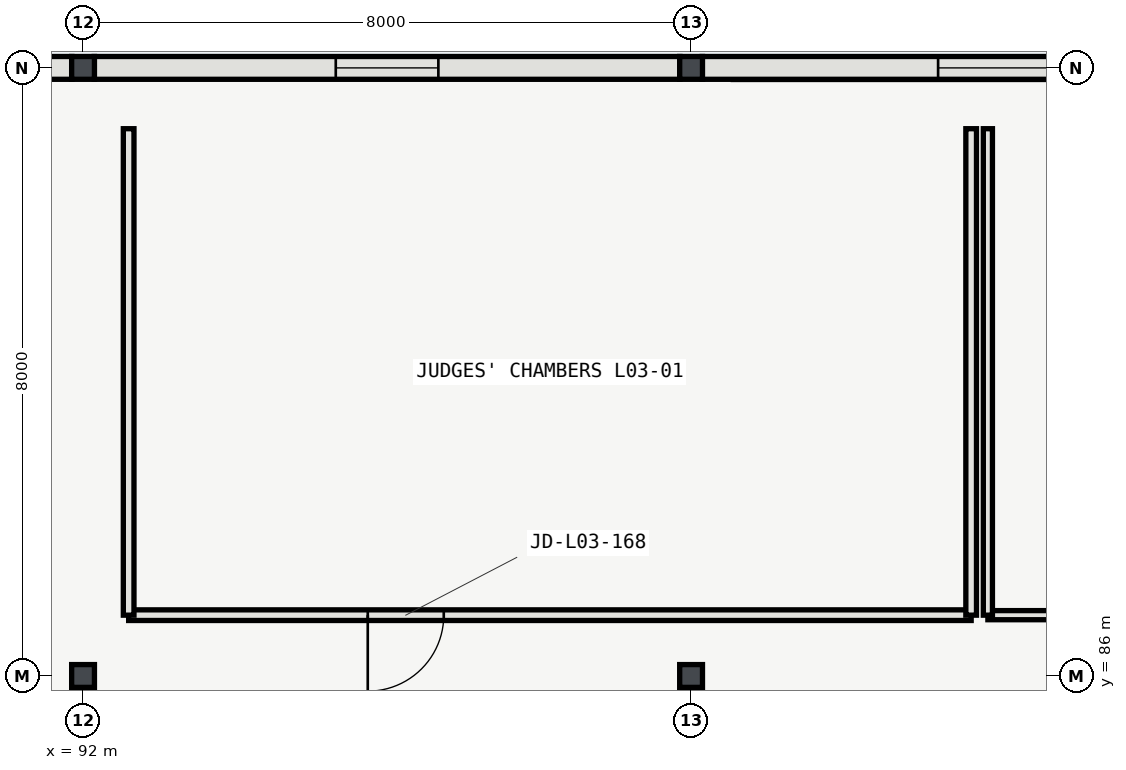
"""IFC4 building model, lengths in metres.
Left out: names, types, materials, properties, quantities, classifications, styles, units other than length and angle.
Written with IfcOpenShell. Run it as: python <this file> out.ifc"""

import sys

from ifc_helpers import new_model, si_unit, direction, frame, frame_2d, origin, origin_2d, place, context, subcontext, project, spatial, rectangle, i_section, extrude, element, fill, save


model = new_model("IFC4")
c1 = context("Model", 3, precision=1e-05, world=origin(), true_north=direction((0.0, 1.0)))
c2 = subcontext(c1, "Body", "Model", "MODEL_VIEW")
j1 = project(units=[si_unit("LENGTHUNIT", "METRE"), si_unit("PLANEANGLEUNIT", "RADIAN")], contexts=[c1])
p1 = place(None, origin())
s1 = spatial("IfcSite", under=j1, at=p1, CompositionType="ELEMENT")
p2 = place(p1, origin())
s2 = spatial("IfcBuilding", under=s1, at=p2, CompositionType="ELEMENT")
p3 = place(p2, frame((0.0, 0.0, 16.2)))
s3 = spatial("IfcBuildingStorey", under=s2, at=p3, CompositionType="ELEMENT", Elevation=16.2)
for number, where, z_axis, x_axis in (
    (1, (92.0, 86.0, 0.0), (0.0, 0.0, 1.0), (1.0, 0.0, 0.0)),
    (2, (92.0, 94.0, 0.0), (0.0, 0.0, 1.0), (1.0, 0.0, 0.0)),
    (3, (100.0, 86.0, 0.0), (0.0, 0.0, 1.0), (1.0, 0.0, 0.0)),
    (4, (100.0, 94.0, 0.0), (0.0, 0.0, 1.0), (1.0, 0.0, 0.0)),
):
    element("IfcColumn", number, at=place(p3, frame(where, z_axis=z_axis, x_axis=x_axis)), inside=s3, PredefinedType="COLUMN", context=c2, shape_type="SweptSolid", body=[
        extrude(i_section(OverallWidth=0.3, OverallDepth=0.3, WebThickness=0.01, FlangeThickness=0.015, FilletRadius=0.018, at=origin_2d()), origin(), (0.0, 0.0, 1.0), 4.2),
    ])
p4 = place(p3, frame((91.854, 94.0, 0.0), z_axis=(0.0, 0.0, 1.0), x_axis=(-1.0, 0.0, 0.0)))
e5 = element("IfcWall", 5, at=p4, inside=s3, PredefinedType="SOLIDWALL", context=c2, shape_type="SweptSolid", body=[
    extrude(rectangle(XDim=7.558, YDim=0.3, at=frame_2d((3.779, 0.0))), origin(), (0.0, 0.0, 1.0), 3.423),
])
p5 = place(p4, frame((3.254, 0.0, 0.95)))
e6 = element("IfcOpeningElement", 6, at=p5, cuts=e5, PredefinedType="OPENING", context=c2, shape_type="SweptSolid", body=[
    extrude(rectangle(XDim=1.2, YDim=1.8, at=frame_2d((0.6, 0.9))), frame((0.0, 0.16, 0.0), z_axis=(0.0, -1.0, 0.0), x_axis=(1.0, 0.0, 0.0)), (0.0, 0.0, 1.0), 0.32),
])
p6 = place(p3, frame((99.854, 94.0, 0.0), z_axis=(0.0, 0.0, 1.0), x_axis=(-1.0, 0.0, 0.0)))
e7 = element("IfcWall", 7, at=p6, inside=s3, PredefinedType="SOLIDWALL", context=c2, shape_type="SweptSolid", body=[
    extrude(rectangle(XDim=7.708, YDim=0.3, at=frame_2d((3.854, 0.0))), origin(), (0.0, 0.0, 1.0), 3.423),
])
p7 = place(p6, frame((3.179, 0.0, 0.95)))
e8 = element("IfcOpeningElement", 8, at=p7, cuts=e7, PredefinedType="OPENING", context=c2, shape_type="SweptSolid", body=[
    extrude(rectangle(XDim=1.35, YDim=1.8, at=frame_2d((0.675, 0.9))), frame((0.0, 0.16, 0.0), z_axis=(0.0, -1.0, 0.0), x_axis=(1.0, 0.0, 0.0)), (0.0, 0.0, 1.0), 0.32),
])
p8 = place(p3, frame((107.854, 94.0, 0.0), z_axis=(0.0, 0.0, 1.0), x_axis=(-1.0, 0.0, 0.0)))
e9 = element("IfcWall", 9, at=p8, inside=s3, PredefinedType="SOLIDWALL", context=c2, shape_type="SweptSolid", body=[
    extrude(rectangle(XDim=7.708, YDim=0.3, at=frame_2d((3.854, 0.0))), origin(), (0.0, 0.0, 1.0), 3.423),
])
p9 = place(p8, frame((3.104, 0.0, 0.95)))
e10 = element("IfcOpeningElement", 10, at=p9, cuts=e9, PredefinedType="OPENING", context=c2, shape_type="SweptSolid", body=[
    extrude(rectangle(XDim=1.5, YDim=1.8, at=frame_2d((0.75, 0.9))), frame((0.0, 0.16, 0.0), z_axis=(0.0, -1.0, 0.0), x_axis=(1.0, 0.0, 0.0)), (0.0, 0.0, 1.0), 0.32),
])
p10 = place(p3, frame((92.6, 86.8, 0.0), z_axis=(0.0, 0.0, 1.0), x_axis=(1.0, 0.0, 0.0)))
e11 = element("IfcWall", 11, at=p10, inside=s3, PredefinedType="PARTITIONING", context=c2, shape_type="SweptSolid", body=[
    extrude(rectangle(XDim=11.085, YDim=0.14, at=frame_2d((5.542, 0.0))), origin(), (0.0, 0.0, 1.0), 3.92),
])
p11 = place(p10, frame((3.146, 0.0, 0.0)))
e12 = element("IfcOpeningElement", 12, at=p11, cuts=e11, PredefinedType="OPENING", context=c2, shape_type="SweptSolid", body=[
    extrude(rectangle(XDim=1.0, YDim=2.2, at=frame_2d((0.5, 1.1))), frame((0.0, 0.08, 0.0), z_axis=(0.0, -1.0, 0.0), x_axis=(1.0, 0.0, 0.0)), (0.0, 0.0, 1.0), 0.16),
])
p12 = place(p3, frame((92.6, 93.2, 0.0), z_axis=(0.0, 0.0, 1.0), x_axis=(0.0, -1.0, 0.0)))
e13 = element("IfcWall", 13, at=p12, inside=s3, PredefinedType="PARTITIONING", context=c2, shape_type="SweptSolid", body=[
    extrude(rectangle(XDim=6.4, YDim=0.14, at=frame_2d((3.2, 0.0))), origin(), (0.0, 0.0, 1.0), 3.92),
])
p13 = place(p3, frame((103.685, 86.8, 0.0), z_axis=(0.0, 0.0, 1.0), x_axis=(0.0, 1.0, 0.0)))
e14 = element("IfcWall", 14, at=p13, inside=s3, PredefinedType="PARTITIONING", context=c2, shape_type="SweptSolid", body=[
    extrude(rectangle(XDim=6.4, YDim=0.14, at=frame_2d((3.2, 0.0))), origin(), (0.0, 0.0, 1.0), 3.476),
])
p14 = place(p3, frame((103.905, 86.8, 0.0), z_axis=(0.0, 0.0, 1.0), x_axis=(1.0, 0.0, 0.0)))
e15 = element("IfcWall", 15, at=p14, inside=s3, PredefinedType="PARTITIONING", context=c2, shape_type="SweptSolid", body=[
    extrude(rectangle(XDim=11.085, YDim=0.12, at=frame_2d((5.542, 0.0))), origin(), (0.0, 0.0, 1.0), 3.92),
])
p15 = place(p14, frame((7.904, 0.0, 0.0)))
e16 = element("IfcOpeningElement", 16, at=p15, cuts=e15, PredefinedType="OPENING", context=c2, shape_type="SweptSolid", body=[
    extrude(rectangle(XDim=0.98, YDim=2.2, at=frame_2d((0.49, 1.1))), frame((0.0, 0.07, 0.0), z_axis=(0.0, -1.0, 0.0), x_axis=(1.0, 0.0, 0.0)), (0.0, 0.0, 1.0), 0.14),
])
p16 = place(p3, frame((103.905, 93.2, 0.0), z_axis=(0.0, 0.0, 1.0), x_axis=(0.0, -1.0, 0.0)))
e17 = element("IfcWall", 17, at=p16, inside=s3, PredefinedType="PARTITIONING", context=c2, shape_type="SweptSolid", body=[
    extrude(rectangle(XDim=6.4, YDim=0.12, at=frame_2d((3.2, 0.0))), origin(), (0.0, 0.0, 1.0), 3.476),
])
p17 = place(p7, origin())
e18 = element("IfcWindow", 18, at=p17, inside=s3, PartitioningType="SINGLE_PANEL", PredefinedType="WINDOW", context=c2, shape_type="SweptSolid", body=[
    extrude(rectangle(XDim=1.35, YDim=1.8, at=frame_2d((0.675, 0.9))), frame((0.0, 0.03, 0.0), z_axis=(0.0, -1.0, 0.0), x_axis=(1.0, 0.0, 0.0)), (0.0, 0.0, 1.0), 0.06),
])
fill(e8, e18)
p18 = place(p9, origin())
e19 = element("IfcWindow", 19, at=p18, inside=s3, PartitioningType="SINGLE_PANEL", PredefinedType="WINDOW", context=c2, shape_type="SweptSolid", body=[
    extrude(rectangle(XDim=1.5, YDim=1.8, at=frame_2d((0.75, 0.9))), frame((0.0, 0.03, 0.0), z_axis=(0.0, -1.0, 0.0), x_axis=(1.0, 0.0, 0.0)), (0.0, 0.0, 1.0), 0.06),
])
fill(e10, e19)
p19 = place(p11, origin())
e20 = element("IfcDoor", 20, at=p19, inside=s3, OperationType="SINGLE_SWING_LEFT", PredefinedType="DOOR", context=c2, shape_type="SweptSolid", body=[
    extrude(rectangle(XDim=1.0, YDim=2.2, at=frame_2d((0.5, 1.1))), frame((0.0, 0.025, 0.0), z_axis=(0.0, -1.0, 0.0), x_axis=(1.0, 0.0, 0.0)), (0.0, 0.0, 1.0), 0.05),
])
fill(e12, e20)
save(model, sys.argv[1])
